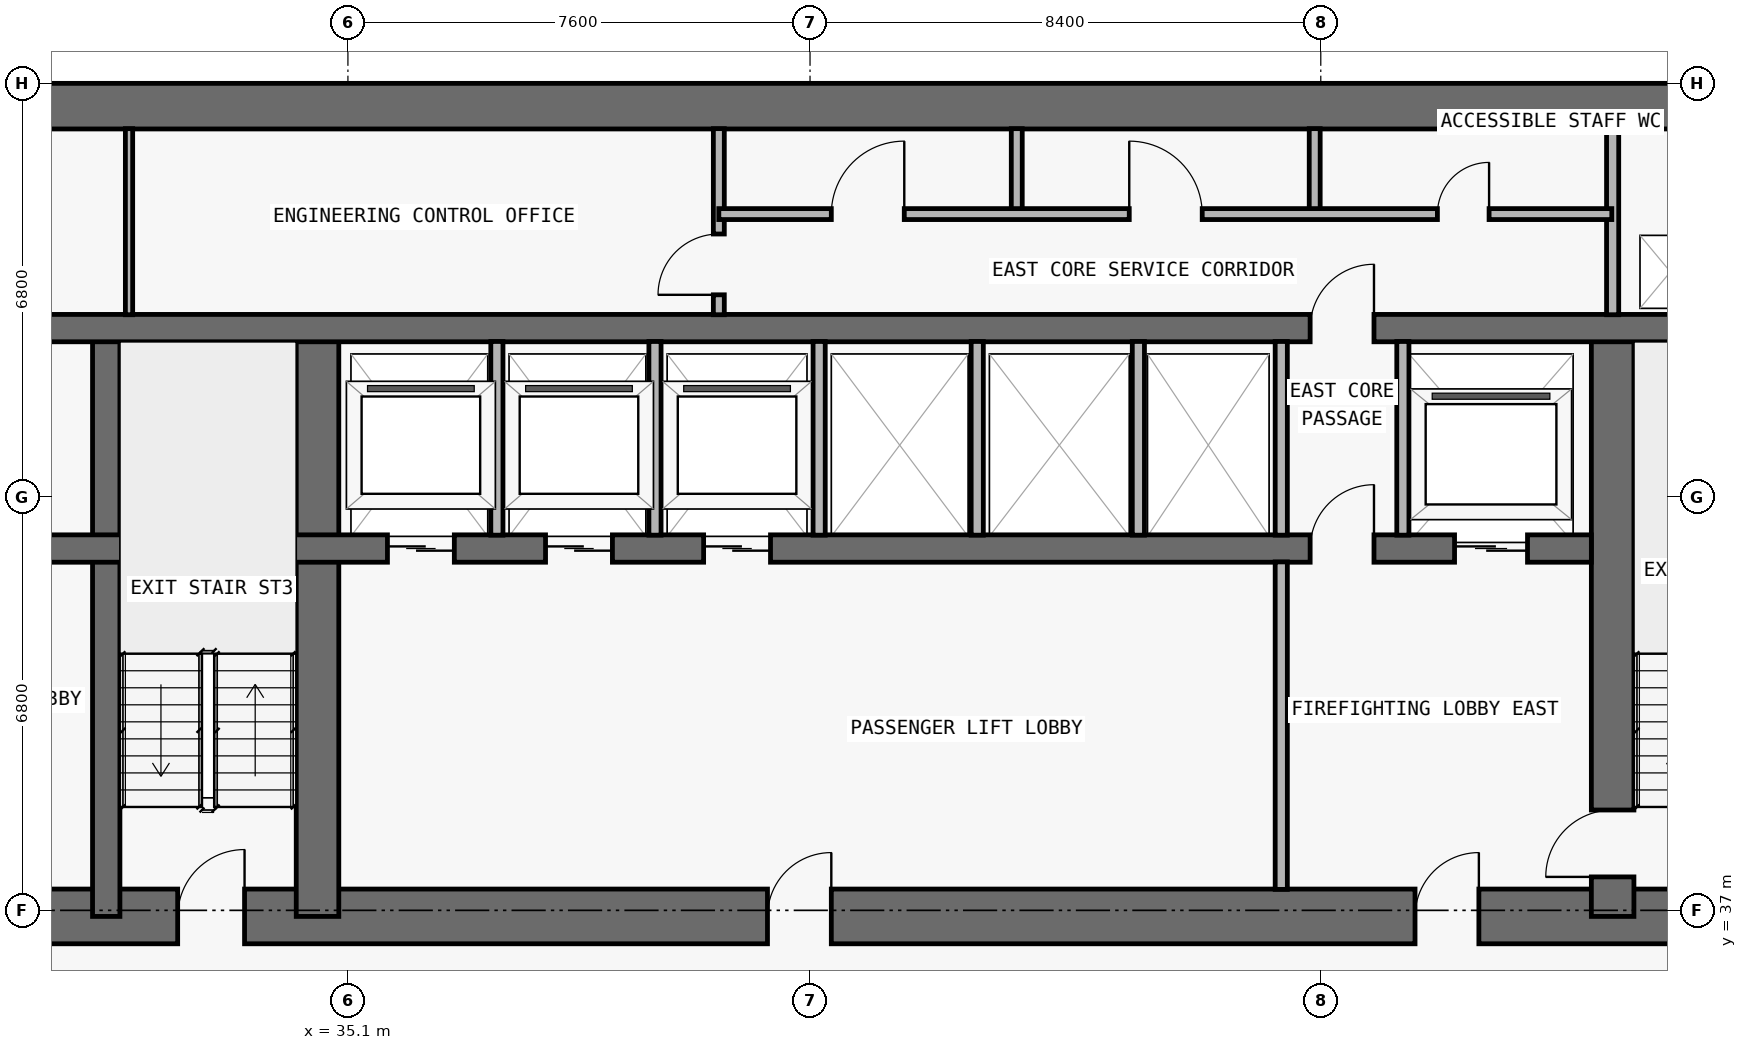
"""IFC4 building model, lengths in metres.
Left out: names, types, materials, properties, quantities, classifications, styles, units other than length and angle.
Written with IfcOpenShell. Run it as: python <this file> out.ifc"""

import sys

from ifc_helpers import new_model, si_unit, direction, frame, frame_2d, origin, place, context, subcontext, project, spatial, rectangle, extrude, element, fill, save


model = new_model("IFC4")
c1 = context("Model", 3, precision=1e-05, world=origin(), true_north=direction((0.0, 1.0)))
c2 = subcontext(c1, "Body", "Model", "MODEL_VIEW")
j1 = project(units=[si_unit("LENGTHUNIT", "METRE"), si_unit("PLANEANGLEUNIT", "RADIAN")], contexts=[c1])
p1 = place(None, origin())
s1 = spatial("IfcSite", under=j1, at=p1, CompositionType="ELEMENT")
p2 = place(p1, origin())
s2 = spatial("IfcBuilding", under=s1, at=p2, CompositionType="ELEMENT")
p3 = place(p2, frame((0.0, 0.0, 36.6)))
s3 = spatial("IfcBuildingStorey", under=s2, at=p3, CompositionType="ELEMENT", Elevation=36.6)
p4 = place(p3, frame((17.75, 36.9, 0.0), z_axis=(0.0, 0.0, 1.0), x_axis=(1.0, 0.0, 0.0)))
e1 = element("IfcWall", 1, at=p4, inside=s3, PredefinedType="SHEAR", context=c2, shape_type="SweptSolid", body=[
    extrude(rectangle(XDim=42.3, YDim=0.9, at=frame_2d((21.15, 0.0))), origin(), (0.0, 0.0, 1.0), 3.05),
])
p5 = place(p4, frame((14.55, 0.0, 0.0)))
e2 = element("IfcOpeningElement", 2, at=p5, cuts=e1, PredefinedType="OPENING", context=c2, shape_type="SweptSolid", body=[
    extrude(rectangle(XDim=1.1, YDim=2.15, at=frame_2d((0.55, 1.075))), frame((0.0, 0.46, 0.0), z_axis=(0.0, -1.0, 0.0), x_axis=(1.0, 0.0, 0.0)), (0.0, 0.0, 1.0), 0.92),
])
p6 = place(p4, frame((6.4, 0.0, 0.0)))
e3 = element("IfcOpeningElement", 3, at=p6, cuts=e1, PredefinedType="OPENING", context=c2, shape_type="SweptSolid", body=[
    extrude(rectangle(XDim=1.05, YDim=2.15, at=frame_2d((0.525, 1.075))), frame((0.0, 0.46, 0.0), z_axis=(0.0, -1.0, 0.0), x_axis=(1.0, 0.0, 0.0)), (0.0, 0.0, 1.0), 0.92),
])
p7 = place(p4, frame((34.9, 0.0, 0.0)))
e4 = element("IfcOpeningElement", 4, at=p7, cuts=e1, PredefinedType="OPENING", context=c2, shape_type="SweptSolid", body=[
    extrude(rectangle(XDim=1.05, YDim=2.15, at=frame_2d((0.525, 1.075))), frame((0.0, 0.46, 0.0), z_axis=(0.0, -1.0, 0.0), x_axis=(1.0, 0.0, 0.0)), (0.0, 0.0, 1.0), 0.92),
])
p8 = place(p4, frame((11.012, 0.0, 0.0)))
e5 = element("IfcOpeningElement", 5, at=p8, cuts=e1, PredefinedType="OPENING", context=c2, shape_type="SweptSolid", body=[
    extrude(rectangle(XDim=1.05, YDim=2.15, at=frame_2d((0.525, 1.075))), frame((0.0, 0.46, 0.0), z_axis=(0.0, -1.0, 0.0), x_axis=(1.0, 0.0, 0.0)), (0.0, 0.0, 1.0), 0.92),
])
p9 = place(p4, frame((24.25, 0.0, 0.0)))
e6 = element("IfcOpeningElement", 6, at=p9, cuts=e1, PredefinedType="OPENING", context=c2, shape_type="SweptSolid", body=[
    extrude(rectangle(XDim=1.05, YDim=2.15, at=frame_2d((0.525, 1.075))), frame((0.0, 0.46, 0.0), z_axis=(0.0, -1.0, 0.0), x_axis=(1.0, 0.0, 0.0)), (0.0, 0.0, 1.0), 0.92),
])
p10 = place(p3, frame((17.75, 50.225, 0.0), z_axis=(0.0, 0.0, 1.0), x_axis=(1.0, 0.0, 0.0)))
e7 = element("IfcWall", 7, at=p10, inside=s3, PredefinedType="SHEAR", context=c2, shape_type="SweptSolid", body=[
    extrude(rectangle(XDim=42.3, YDim=0.75, at=frame_2d((21.15, 0.0))), origin(), (0.0, 0.0, 1.0), 3.05),
])
p11 = place(p3, frame((55.9, 36.9, 0.0), z_axis=(0.0, 0.0, 1.0), x_axis=(0.0, 1.0, 0.0)))
e8 = element("IfcWall", 8, at=p11, inside=s3, PredefinedType="SHEAR", context=c2, shape_type="SweptSolid", body=[
    extrude(rectangle(XDim=9.675, YDim=0.7, at=frame_2d((4.837, 0.0))), origin(), (0.0, 0.0, 1.0), 3.05),
])
p12 = place(p11, frame((0.65, 0.0, 0.0)))
e9 = element("IfcOpeningElement", 9, at=p12, cuts=e8, PredefinedType="OPENING", context=c2, shape_type="SweptSolid", body=[
    extrude(rectangle(XDim=1.1, YDim=2.15, at=frame_2d((0.55, 1.075))), frame((0.0, 0.36, 0.0), z_axis=(0.0, -1.0, 0.0), x_axis=(1.0, 0.0, 0.0)), (0.0, 0.0, 1.0), 0.72),
])
p13 = place(p3, frame((31.125, 36.9, 0.0), z_axis=(0.0, 0.0, 1.0), x_axis=(0.0, 1.0, 0.0)))
e10 = element("IfcWall", 10, at=p13, inside=s3, PredefinedType="SHEAR", context=c2, shape_type="SweptSolid", body=[
    extrude(rectangle(XDim=9.675, YDim=0.45, at=frame_2d((4.837, 0.0))), origin(), (0.0, 0.0, 1.0), 3.05),
])
p14 = place(p3, frame((34.6, 36.9, 0.0), z_axis=(0.0, 0.0, 1.0), x_axis=(0.0, 1.0, 0.0)))
e11 = element("IfcWall", 11, at=p14, inside=s3, PredefinedType="SHEAR", context=c2, shape_type="SweptSolid", body=[
    extrude(rectangle(XDim=9.675, YDim=0.7, at=frame_2d((4.837, 0.0))), origin(), (0.0, 0.0, 1.0), 3.05),
])
p15 = place(p3, frame((22.25, 42.95, 0.0), z_axis=(0.0, 0.0, 1.0), x_axis=(1.0, 0.0, 0.0)))
e12 = element("IfcWall", 12, at=p15, inside=s3, PredefinedType="SHEAR", context=c2, shape_type="SweptSolid", body=[
    extrude(rectangle(XDim=33.3, YDim=0.45, at=frame_2d((16.65, 0.0))), origin(), (0.0, 0.0, 1.0), 3.05),
])
p16 = place(p15, frame((1.05, 0.0, 0.0)))
e13 = element("IfcOpeningElement", 13, at=p16, cuts=e12, PredefinedType="OPENING", context=c2, shape_type="SweptSolid", body=[
    extrude(rectangle(XDim=1.2, YDim=2.2, at=frame_2d((0.6, 1.1))), frame((0.0, 0.235, 0.0), z_axis=(0.0, -1.0, 0.0), x_axis=(1.0, 0.0, 0.0)), (0.0, 0.0, 1.0), 0.47),
])
p17 = place(p15, frame((31.05, 0.0, 0.0)))
e14 = element("IfcOpeningElement", 14, at=p17, cuts=e12, PredefinedType="OPENING", context=c2, shape_type="SweptSolid", body=[
    extrude(rectangle(XDim=1.2, YDim=2.2, at=frame_2d((0.6, 1.1))), frame((0.0, 0.235, 0.0), z_axis=(0.0, -1.0, 0.0), x_axis=(1.0, 0.0, 0.0)), (0.0, 0.0, 1.0), 0.47),
])
p18 = place(p15, frame((13.5, 0.0, 0.0)))
e15 = element("IfcOpeningElement", 15, at=p18, cuts=e12, PredefinedType="OPENING", context=c2, shape_type="SweptSolid", body=[
    extrude(rectangle(XDim=1.1, YDim=2.2, at=frame_2d((0.55, 1.1))), frame((0.0, 0.235, 0.0), z_axis=(0.0, -1.0, 0.0), x_axis=(1.0, 0.0, 0.0)), (0.0, 0.0, 1.0), 0.47),
])
p19 = place(p15, frame((16.1, 0.0, 0.0)))
e16 = element("IfcOpeningElement", 16, at=p19, cuts=e12, PredefinedType="OPENING", context=c2, shape_type="SweptSolid", body=[
    extrude(rectangle(XDim=1.1, YDim=2.2, at=frame_2d((0.55, 1.1))), frame((0.0, 0.235, 0.0), z_axis=(0.0, -1.0, 0.0), x_axis=(1.0, 0.0, 0.0)), (0.0, 0.0, 1.0), 0.47),
])
p20 = place(p15, frame((18.7, 0.0, 0.0)))
e17 = element("IfcOpeningElement", 17, at=p20, cuts=e12, PredefinedType="OPENING", context=c2, shape_type="SweptSolid", body=[
    extrude(rectangle(XDim=1.1, YDim=2.2, at=frame_2d((0.55, 1.1))), frame((0.0, 0.235, 0.0), z_axis=(0.0, -1.0, 0.0), x_axis=(1.0, 0.0, 0.0)), (0.0, 0.0, 1.0), 0.47),
])
p21 = place(p15, frame((3.625, 0.0, 0.0)))
e18 = element("IfcOpeningElement", 18, at=p21, cuts=e12, PredefinedType="OPENING", context=c2, shape_type="SweptSolid", body=[
    extrude(rectangle(XDim=1.05, YDim=2.15, at=frame_2d((0.525, 1.075))), frame((0.0, 0.235, 0.0), z_axis=(0.0, -1.0, 0.0), x_axis=(1.0, 0.0, 0.0)), (0.0, 0.0, 1.0), 0.47),
])
p22 = place(p15, frame((28.675, 0.0, 0.0)))
e19 = element("IfcOpeningElement", 19, at=p22, cuts=e12, PredefinedType="OPENING", context=c2, shape_type="SweptSolid", body=[
    extrude(rectangle(XDim=1.05, YDim=2.15, at=frame_2d((0.525, 1.075))), frame((0.0, 0.235, 0.0), z_axis=(0.0, -1.0, 0.0), x_axis=(1.0, 0.0, 0.0)), (0.0, 0.0, 1.0), 0.47),
])
p23 = place(p3, frame((18.2, 46.575, 0.0), z_axis=(0.0, 0.0, 1.0), x_axis=(1.0, 0.0, 0.0)))
e20 = element("IfcWall", 20, at=p23, inside=s3, PredefinedType="SHEAR", context=c2, shape_type="SweptSolid", body=[
    extrude(rectangle(XDim=41.4, YDim=0.45, at=frame_2d((20.7, 0.0))), origin(), (0.0, 0.0, 1.0), 3.05),
])
p24 = place(p23, frame((7.7, 0.0, 0.0)))
e21 = element("IfcOpeningElement", 21, at=p24, cuts=e20, PredefinedType="OPENING", context=c2, shape_type="SweptSolid", body=[
    extrude(rectangle(XDim=1.0, YDim=2.2, at=frame_2d((0.5, 1.1))), frame((0.0, 0.235, 0.0), z_axis=(0.0, -1.0, 0.0), x_axis=(1.0, 0.0, 0.0)), (0.0, 0.0, 1.0), 0.47),
])
p25 = place(p23, frame((32.725, 0.0, 0.0)))
e22 = element("IfcOpeningElement", 22, at=p25, cuts=e20, PredefinedType="OPENING", context=c2, shape_type="SweptSolid", body=[
    extrude(rectangle(XDim=1.05, YDim=2.15, at=frame_2d((0.525, 1.075))), frame((0.0, 0.235, 0.0), z_axis=(0.0, -1.0, 0.0), x_axis=(1.0, 0.0, 0.0)), (0.0, 0.0, 1.0), 0.47),
])
p26 = place(p3, frame((31.5, 46.795, 0.0), z_axis=(0.0, 0.0, 1.0), x_axis=(0.0, 1.0, 0.0)))
e23 = element("IfcWall", 23, at=p26, inside=s3, PredefinedType="PARTITIONING", context=c2, shape_type="SweptSolid", body=[
    extrude(rectangle(XDim=3.06, YDim=0.12, at=frame_2d((1.53, 0.0))), origin(), (0.0, 0.0, 1.0), 3.05),
])
for number, where, z_axis, x_axis in (
    (24, (37.55, 43.17, 0.0), (0.0, 0.0, 1.0), (0.0, 1.0, 0.0)),
    (25, (40.15, 43.17, 0.0), (0.0, 0.0, 1.0), (0.0, 1.0, 0.0)),
):
    element("IfcWall", number, at=place(p3, frame(where, z_axis=z_axis, x_axis=x_axis)), inside=s3, PredefinedType="PARTITIONING", context=c2, shape_type="SweptSolid", body=[
        extrude(rectangle(XDim=3.185, YDim=0.2, at=frame_2d((1.593, 0.0))), origin(), (0.0, 0.0, 1.0), 3.05),
    ])
p27 = place(p3, frame((41.2, 46.795, 0.0), z_axis=(0.0, 0.0, 1.0), x_axis=(0.0, 1.0, 0.0)))
e26 = element("IfcWall", 26, at=p27, inside=s3, PredefinedType="PARTITIONING", context=c2, shape_type="SweptSolid", body=[
    extrude(rectangle(XDim=3.06, YDim=0.18, at=frame_2d((1.53, 0.0))), origin(), (0.0, 0.0, 1.0), 3.05),
])
p28 = place(p27, frame((0.327, 0.0, 0.0)))
e27 = element("IfcOpeningElement", 27, at=p28, cuts=e26, PredefinedType="OPENING", context=c2, shape_type="SweptSolid", body=[
    extrude(rectangle(XDim=1.0, YDim=2.2, at=frame_2d((0.5, 1.1))), frame((0.0, 0.1, 0.0), z_axis=(0.0, -1.0, 0.0), x_axis=(1.0, 0.0, 0.0)), (0.0, 0.0, 1.0), 0.2),
])
for number, where, z_axis, x_axis in (
    (28, (42.85, 43.17, 0.0), (0.0, 0.0, 1.0), (0.0, 1.0, 0.0)),
    (29, (45.45, 43.17, 0.0), (0.0, 0.0, 1.0), (0.0, 1.0, 0.0)),
):
    element("IfcWall", number, at=place(p3, frame(where, z_axis=z_axis, x_axis=x_axis)), inside=s3, PredefinedType="PARTITIONING", context=c2, shape_type="SweptSolid", body=[
        extrude(rectangle(XDim=3.185, YDim=0.2, at=frame_2d((1.593, 0.0))), origin(), (0.0, 0.0, 1.0), 3.05),
    ])
p29 = place(p3, frame((46.1, 48.45, 0.0), z_axis=(0.0, 0.0, 1.0), x_axis=(0.0, 1.0, 0.0)))
e30 = element("IfcWall", 30, at=p29, inside=s3, PredefinedType="PARTITIONING", context=c2, shape_type="SweptSolid", body=[
    extrude(rectangle(XDim=1.405, YDim=0.18, at=frame_2d((0.703, 0.0))), origin(), (0.0, 0.0, 1.0), 3.05),
])
p30 = place(p3, frame((48.1, 43.17, 0.0), z_axis=(0.0, 0.0, 1.0), x_axis=(0.0, 1.0, 0.0)))
e31 = element("IfcWall", 31, at=p30, inside=s3, PredefinedType="PARTITIONING", context=c2, shape_type="SweptSolid", body=[
    extrude(rectangle(XDim=3.185, YDim=0.2, at=frame_2d((1.593, 0.0))), origin(), (0.0, 0.0, 1.0), 3.05),
])
p31 = place(p3, frame((50.45, 37.345, 0.0), z_axis=(0.0, 0.0, 1.0), x_axis=(0.0, 1.0, 0.0)))
e32 = element("IfcWall", 32, at=p31, inside=s3, PredefinedType="PARTITIONING", context=c2, shape_type="SweptSolid", body=[
    extrude(rectangle(XDim=5.385, YDim=0.2, at=frame_2d((2.692, 0.0))), origin(), (0.0, 0.0, 1.0), 3.05),
])
p32 = place(p3, frame((50.45, 43.17, 0.0), z_axis=(0.0, 0.0, 1.0), x_axis=(0.0, 1.0, 0.0)))
e33 = element("IfcWall", 33, at=p32, inside=s3, PredefinedType="PARTITIONING", context=c2, shape_type="SweptSolid", body=[
    extrude(rectangle(XDim=3.185, YDim=0.2, at=frame_2d((1.593, 0.0))), origin(), (0.0, 0.0, 1.0), 3.05),
])
p33 = place(p3, frame((51.0, 48.45, 0.0), z_axis=(0.0, 0.0, 1.0), x_axis=(0.0, 1.0, 0.0)))
e34 = element("IfcWall", 34, at=p33, inside=s3, PredefinedType="PARTITIONING", context=c2, shape_type="SweptSolid", body=[
    extrude(rectangle(XDim=1.405, YDim=0.18, at=frame_2d((0.703, 0.0))), origin(), (0.0, 0.0, 1.0), 3.05),
])
p34 = place(p3, frame((52.45, 43.17, 0.0), z_axis=(0.0, 0.0, 1.0), x_axis=(0.0, 1.0, 0.0)))
e35 = element("IfcWall", 35, at=p34, inside=s3, PredefinedType="PARTITIONING", context=c2, shape_type="SweptSolid", body=[
    extrude(rectangle(XDim=3.185, YDim=0.2, at=frame_2d((1.593, 0.0))), origin(), (0.0, 0.0, 1.0), 3.05),
])
p35 = place(p3, frame((55.9, 46.795, 0.0), z_axis=(0.0, 0.0, 1.0), x_axis=(0.0, 1.0, 0.0)))
e36 = element("IfcWall", 36, at=p35, inside=s3, PredefinedType="PARTITIONING", context=c2, shape_type="SweptSolid", body=[
    extrude(rectangle(XDim=3.06, YDim=0.2, at=frame_2d((1.53, 0.0))), origin(), (0.0, 0.0, 1.0), 3.05),
])
p36 = place(p3, frame((41.2, 48.45, 0.0), z_axis=(0.0, 0.0, 1.0), x_axis=(1.0, 0.0, 0.0)))
e37 = element("IfcWall", 37, at=p36, inside=s3, PredefinedType="PARTITIONING", context=c2, shape_type="SweptSolid", body=[
    extrude(rectangle(XDim=14.686, YDim=0.18, at=frame_2d((7.343, 0.0))), origin(), (0.0, 0.0, 1.0), 3.05),
])
p37 = place(p36, frame((1.85, 0.0, 0.0)))
e38 = element("IfcOpeningElement", 38, at=p37, cuts=e37, PredefinedType="OPENING", context=c2, shape_type="SweptSolid", body=[
    extrude(rectangle(XDim=1.2, YDim=2.2, at=frame_2d((0.6, 1.1))), frame((0.0, 0.1, 0.0), z_axis=(0.0, -1.0, 0.0), x_axis=(1.0, 0.0, 0.0)), (0.0, 0.0, 1.0), 0.2),
])
p38 = place(p36, frame((6.75, 0.0, 0.0)))
e39 = element("IfcOpeningElement", 39, at=p38, cuts=e37, PredefinedType="OPENING", context=c2, shape_type="SweptSolid", body=[
    extrude(rectangle(XDim=1.2, YDim=2.2, at=frame_2d((0.6, 1.1))), frame((0.0, 0.1, 0.0), z_axis=(0.0, -1.0, 0.0), x_axis=(1.0, 0.0, 0.0)), (0.0, 0.0, 1.0), 0.2),
])
p39 = place(p36, frame((11.818, 0.0, 0.0)))
e40 = element("IfcOpeningElement", 40, at=p39, cuts=e37, PredefinedType="OPENING", context=c2, shape_type="SweptSolid", body=[
    extrude(rectangle(XDim=0.85, YDim=2.1, at=frame_2d((0.425, 1.05))), frame((0.0, 0.1, 0.0), z_axis=(0.0, -1.0, 0.0), x_axis=(1.0, 0.0, 0.0)), (0.0, 0.0, 1.0), 0.2),
])
p40 = place(p17, origin())
e41 = element("IfcDoor", 41, at=p40, inside=s3, OperationType="DOUBLE_DOOR_SLIDING", PredefinedType="DOOR", context=c2, shape_type="SweptSolid", body=[
    extrude(rectangle(XDim=1.2, YDim=2.2, at=frame_2d((0.6, 1.1))), frame((0.0, 0.025, 0.0), z_axis=(0.0, -1.0, 0.0), x_axis=(1.0, 0.0, 0.0)), (0.0, 0.0, 1.0), 0.05),
])
fill(e14, e41)
p41 = place(p18, origin())
e42 = element("IfcDoor", 42, at=p41, inside=s3, OperationType="DOUBLE_DOOR_SLIDING", PredefinedType="DOOR", context=c2, shape_type="SweptSolid", body=[
    extrude(rectangle(XDim=1.1, YDim=2.2, at=frame_2d((0.55, 1.1))), frame((0.0, 0.025, 0.0), z_axis=(0.0, -1.0, 0.0), x_axis=(1.0, 0.0, 0.0)), (0.0, 0.0, 1.0), 0.05),
])
fill(e15, e42)
p42 = place(p19, origin())
e43 = element("IfcDoor", 43, at=p42, inside=s3, OperationType="DOUBLE_DOOR_SLIDING", PredefinedType="DOOR", context=c2, shape_type="SweptSolid", body=[
    extrude(rectangle(XDim=1.1, YDim=2.2, at=frame_2d((0.55, 1.1))), frame((0.0, 0.025, 0.0), z_axis=(0.0, -1.0, 0.0), x_axis=(1.0, 0.0, 0.0)), (0.0, 0.0, 1.0), 0.05),
])
fill(e16, e43)
p43 = place(p20, origin())
e44 = element("IfcDoor", 44, at=p43, inside=s3, OperationType="DOUBLE_DOOR_SLIDING", PredefinedType="DOOR", context=c2, shape_type="SweptSolid", body=[
    extrude(rectangle(XDim=1.1, YDim=2.2, at=frame_2d((0.55, 1.1))), frame((0.0, 0.025, 0.0), z_axis=(0.0, -1.0, 0.0), x_axis=(1.0, 0.0, 0.0)), (0.0, 0.0, 1.0), 0.05),
])
fill(e17, e44)
p44 = place(p5, origin())
e45 = element("IfcDoor", 45, at=p44, inside=s3, OperationType="SINGLE_SWING_RIGHT", PredefinedType="DOOR", context=c2, shape_type="SweptSolid", body=[
    extrude(rectangle(XDim=1.1, YDim=2.15, at=frame_2d((0.55, 1.075))), frame((0.0, 0.025, 0.0), z_axis=(0.0, -1.0, 0.0), x_axis=(1.0, 0.0, 0.0)), (0.0, 0.0, 1.0), 0.05),
])
fill(e2, e45)
p45 = place(p7, origin())
e46 = element("IfcDoor", 46, at=p45, inside=s3, OperationType="SINGLE_SWING_RIGHT", PredefinedType="DOOR", context=c2, shape_type="SweptSolid", body=[
    extrude(rectangle(XDim=1.05, YDim=2.15, at=frame_2d((0.525, 1.075))), frame((0.0, 0.025, 0.0), z_axis=(0.0, -1.0, 0.0), x_axis=(1.0, 0.0, 0.0)), (0.0, 0.0, 1.0), 0.05),
])
fill(e4, e46)
p46 = place(p12, origin())
e47 = element("IfcDoor", 47, at=p46, inside=s3, OperationType="SINGLE_SWING_LEFT", PredefinedType="DOOR", context=c2, shape_type="SweptSolid", body=[
    extrude(rectangle(XDim=1.1, YDim=2.15, at=frame_2d((0.55, 1.075))), frame((0.0, 0.025, 0.0), z_axis=(0.0, -1.0, 0.0), x_axis=(1.0, 0.0, 0.0)), (0.0, 0.0, 1.0), 0.05),
])
fill(e9, e47)
p47 = place(p22, origin())
e48 = element("IfcDoor", 48, at=p47, inside=s3, OperationType="SINGLE_SWING_RIGHT", PredefinedType="DOOR", context=c2, shape_type="SweptSolid", body=[
    extrude(rectangle(XDim=1.05, YDim=2.15, at=frame_2d((0.525, 1.075))), frame((0.0, 0.025, 0.0), z_axis=(0.0, -1.0, 0.0), x_axis=(1.0, 0.0, 0.0)), (0.0, 0.0, 1.0), 0.05),
])
fill(e19, e48)
p48 = place(p9, origin())
e49 = element("IfcDoor", 49, at=p48, inside=s3, OperationType="SINGLE_SWING_RIGHT", PredefinedType="DOOR", context=c2, shape_type="SweptSolid", body=[
    extrude(rectangle(XDim=1.05, YDim=2.15, at=frame_2d((0.525, 1.075))), frame((0.0, 0.025, 0.0), z_axis=(0.0, -1.0, 0.0), x_axis=(1.0, 0.0, 0.0)), (0.0, 0.0, 1.0), 0.05),
])
fill(e6, e49)
p49 = place(p25, origin())
e50 = element("IfcDoor", 50, at=p49, inside=s3, OperationType="SINGLE_SWING_RIGHT", PredefinedType="DOOR", context=c2, shape_type="SweptSolid", body=[
    extrude(rectangle(XDim=1.05, YDim=2.15, at=frame_2d((0.525, 1.075))), frame((0.0, 0.025, 0.0), z_axis=(0.0, -1.0, 0.0), x_axis=(1.0, 0.0, 0.0)), (0.0, 0.0, 1.0), 0.05),
])
fill(e22, e50)
p50 = place(p28, origin())
e51 = element("IfcDoor", 51, at=p50, inside=s3, OperationType="SINGLE_SWING_LEFT", PredefinedType="DOOR", context=c2, shape_type="SweptSolid", body=[
    extrude(rectangle(XDim=1.0, YDim=2.2, at=frame_2d((0.5, 1.1))), frame((0.0, 0.025, 0.0), z_axis=(0.0, -1.0, 0.0), x_axis=(1.0, 0.0, 0.0)), (0.0, 0.0, 1.0), 0.05),
])
fill(e27, e51)
p51 = place(p37, origin())
e52 = element("IfcDoor", 52, at=p51, inside=s3, OperationType="SINGLE_SWING_RIGHT", PredefinedType="DOOR", context=c2, shape_type="SweptSolid", body=[
    extrude(rectangle(XDim=1.2, YDim=2.2, at=frame_2d((0.6, 1.1))), frame((0.0, 0.025, 0.0), z_axis=(0.0, -1.0, 0.0), x_axis=(1.0, 0.0, 0.0)), (0.0, 0.0, 1.0), 0.05),
])
fill(e38, e52)
p52 = place(p38, origin())
e53 = element("IfcDoor", 53, at=p52, inside=s3, OperationType="SINGLE_SWING_LEFT", PredefinedType="DOOR", context=c2, shape_type="SweptSolid", body=[
    extrude(rectangle(XDim=1.2, YDim=2.2, at=frame_2d((0.6, 1.1))), frame((0.0, 0.025, 0.0), z_axis=(0.0, -1.0, 0.0), x_axis=(1.0, 0.0, 0.0)), (0.0, 0.0, 1.0), 0.05),
])
fill(e39, e53)
p53 = place(p39, origin())
e54 = element("IfcDoor", 54, at=p53, inside=s3, OperationType="SINGLE_SWING_RIGHT", PredefinedType="DOOR", context=c2, shape_type="SweptSolid", body=[
    extrude(rectangle(XDim=0.85, YDim=2.1, at=frame_2d((0.425, 1.05))), frame((0.0, 0.025, 0.0), z_axis=(0.0, -1.0, 0.0), x_axis=(1.0, 0.0, 0.0)), (0.0, 0.0, 1.0), 0.05),
])
fill(e40, e54)
save(model, sys.argv[1])
